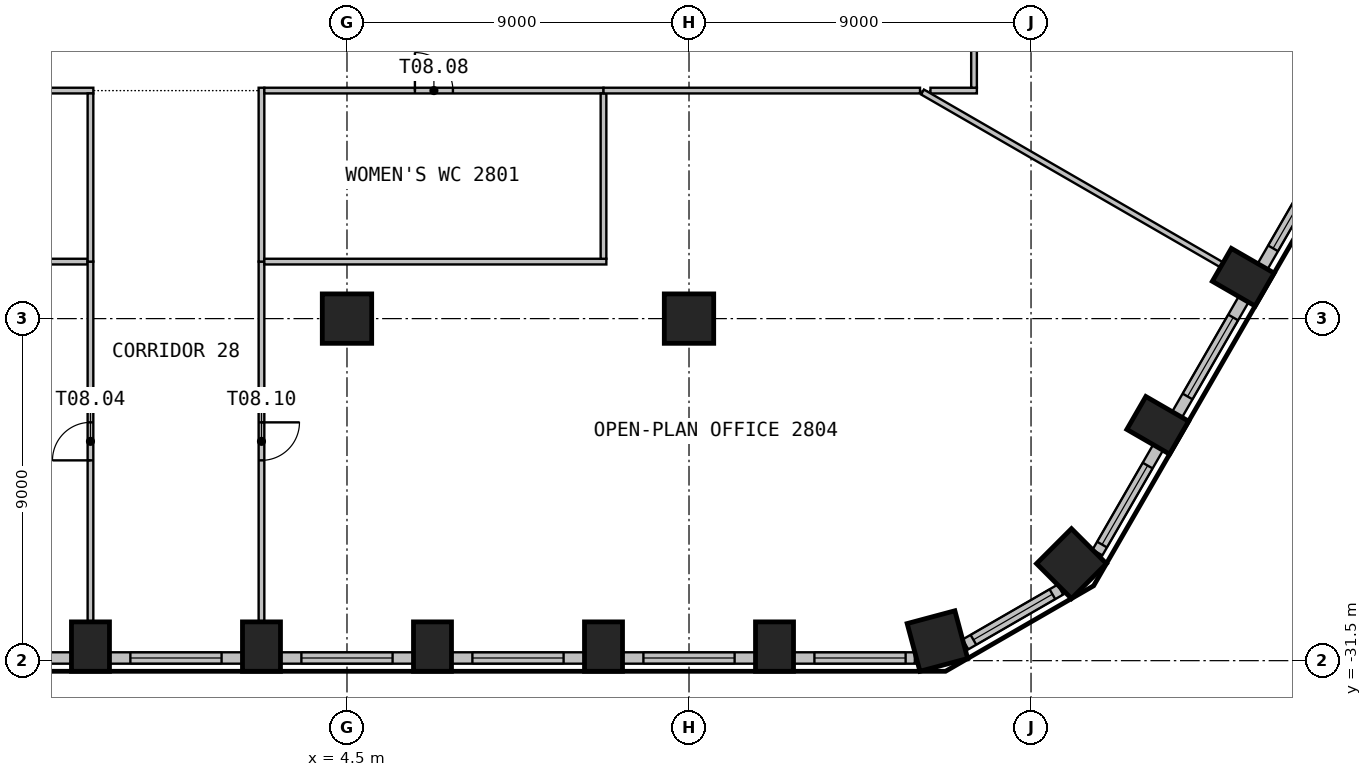
"""IFC4 building model, lengths in metres.
Left out: names, types, materials, properties, quantities, classifications, styles, units other than length and angle.
Written with IfcOpenShell. Run it as: python <this file> out.ifc"""

import sys

from ifc_helpers import new_model, si_unit, direction, frame, frame_2d, origin, origin_2d, place, context, subcontext, project, spatial, rectangle, circle, extrude, element, fill, save


model = new_model("IFC4")
c1 = context("Model", 3, precision=1e-05, world=origin(), true_north=direction((0.0, 1.0)))
c2 = subcontext(c1, "Body", "Model", "MODEL_VIEW")
j1 = project(units=[si_unit("LENGTHUNIT", "METRE"), si_unit("PLANEANGLEUNIT", "RADIAN")], contexts=[c1])
p1 = place(None, origin())
s1 = spatial("IfcSite", under=j1, at=p1, CompositionType="ELEMENT")
p2 = place(p1, origin())
s2 = spatial("IfcBuilding", under=s1, at=p2, CompositionType="ELEMENT")
p3 = place(p2, frame((0.0, 0.0, 116.4)))
s3 = spatial("IfcBuildingStorey", under=s2, at=p3, CompositionType="ELEMENT", Elevation=116.4)
for number, where, z_axis, x_axis in (
    (1, (-2.25, -31.13, 0.0), (0.0, 0.0, 1.0), (1.0, 0.0, 0.0)),
    (2, (2.25, -31.13, 0.0), (0.0, 0.0, 1.0), (1.0, 0.0, 0.0)),
    (3, (6.75, -31.13, 0.0), (0.0, 0.0, 1.0), (1.0, 0.0, 0.0)),
    (4, (11.25, -31.13, 0.0), (0.0, 0.0, 1.0), (1.0, 0.0, 0.0)),
    (5, (15.75, -31.13, 0.0), (0.0, 0.0, 1.0), (1.0, 0.0, 0.0)),
):
    element("IfcColumn", number, at=place(p3, frame(where, z_axis=z_axis, x_axis=x_axis)), inside=s3, PredefinedType="COLUMN", context=c2, shape_type="SweptSolid", body=[
        extrude(rectangle(XDim=1.0, YDim=1.3, at=origin_2d()), origin(), (0.0, 0.0, 1.0), 3.525),
    ])
for number, where, z_axis, x_axis in (
    (6, (20.037, -30.984, 0.0), (0.0, 0.0, 1.0), (0.966, 0.259, 0.0)),
    (7, (23.564, -28.947, 0.0), (0.0, 0.0, 1.0), (0.707, 0.707, 0.0)),
):
    element("IfcColumn", number, at=place(p3, frame(where, z_axis=z_axis, x_axis=x_axis)), inside=s3, PredefinedType="COLUMN", context=c2, shape_type="SweptSolid", body=[
        extrude(rectangle(XDim=1.3, YDim=1.3, at=origin_2d()), origin(), (0.0, 0.0, 1.0), 3.525),
    ])
for number, where, z_axis, x_axis in (
    (8, (25.834, -25.308, 0.0), (0.0, 0.0, 1.0), (0.5, 0.866, 0.0)),
    (9, (28.084, -21.411, 0.0), (0.0, 0.0, 1.0), (0.5, 0.866, 0.0)),
):
    element("IfcColumn", number, at=place(p3, frame(where, z_axis=z_axis, x_axis=x_axis)), inside=s3, PredefinedType="COLUMN", context=c2, shape_type="SweptSolid", body=[
        extrude(rectangle(XDim=1.0, YDim=1.3, at=origin_2d()), origin(), (0.0, 0.0, 1.0), 3.525),
    ])
for number, where, z_axis, x_axis in (
    (10, (4.5, -22.5, 0.0), (0.0, 0.0, 1.0), (1.0, 0.0, 0.0)),
    (11, (13.5, -22.5, 0.0), (0.0, 0.0, 1.0), (1.0, 0.0, 0.0)),
):
    element("IfcColumn", number, at=place(p3, frame(where, z_axis=z_axis, x_axis=x_axis)), inside=s3, PredefinedType="COLUMN", context=c2, shape_type="SweptSolid", body=[
        extrude(circle(Radius=0.65, at=origin_2d()), origin(), (0.0, 0.0, 1.0), 3.525),
    ])
p4 = place(p3, frame((-6.25, -31.43, 0.0), z_axis=(0.0, 0.0, 1.0), x_axis=(1.0, 0.0, 0.0)))
e12 = element("IfcWall", 12, at=p4, inside=s3, PredefinedType="SOLIDWALL", context=c2, shape_type="SweptSolid", body=[
    extrude(rectangle(XDim=3.499, YDim=0.3, at=frame_2d((1.75, 0.0))), origin(), (0.0, 0.0, 1.0), 3.525),
])
p5 = place(p4, frame((0.55, 0.0, 0.9)))
e13 = element("IfcOpeningElement", 13, at=p5, cuts=e12, PredefinedType="OPENING", context=c2, shape_type="SweptSolid", body=[
    extrude(rectangle(XDim=2.4, YDim=2.1, at=frame_2d((1.2, 1.05))), frame((0.0, 0.16, 0.0), z_axis=(0.0, -1.0, 0.0), x_axis=(1.0, 0.0, 0.0)), (0.0, 0.0, 1.0), 0.32),
])
p6 = place(p3, frame((-1.75, -31.43, 0.0), z_axis=(0.0, 0.0, 1.0), x_axis=(1.0, 0.0, 0.0)))
e14 = element("IfcWall", 14, at=p6, inside=s3, PredefinedType="SOLIDWALL", context=c2, shape_type="SweptSolid", body=[
    extrude(rectangle(XDim=3.499, YDim=0.3, at=frame_2d((1.75, 0.0))), origin(), (0.0, 0.0, 1.0), 3.525),
])
p7 = place(p6, frame((0.55, 0.0, 0.9)))
e15 = element("IfcOpeningElement", 15, at=p7, cuts=e14, PredefinedType="OPENING", context=c2, shape_type="SweptSolid", body=[
    extrude(rectangle(XDim=2.4, YDim=2.1, at=frame_2d((1.2, 1.05))), frame((0.0, 0.16, 0.0), z_axis=(0.0, -1.0, 0.0), x_axis=(1.0, 0.0, 0.0)), (0.0, 0.0, 1.0), 0.32),
])
p8 = place(p3, frame((2.75, -31.43, 0.0), z_axis=(0.0, 0.0, 1.0), x_axis=(1.0, 0.0, 0.0)))
e16 = element("IfcWall", 16, at=p8, inside=s3, PredefinedType="SOLIDWALL", context=c2, shape_type="SweptSolid", body=[
    extrude(rectangle(XDim=3.499, YDim=0.3, at=frame_2d((1.75, 0.0))), origin(), (0.0, 0.0, 1.0), 3.525),
])
p9 = place(p8, frame((0.55, 0.0, 0.9)))
e17 = element("IfcOpeningElement", 17, at=p9, cuts=e16, PredefinedType="OPENING", context=c2, shape_type="SweptSolid", body=[
    extrude(rectangle(XDim=2.4, YDim=2.1, at=frame_2d((1.2, 1.05))), frame((0.0, 0.16, 0.0), z_axis=(0.0, -1.0, 0.0), x_axis=(1.0, 0.0, 0.0)), (0.0, 0.0, 1.0), 0.32),
])
p10 = place(p3, frame((7.25, -31.43, 0.0), z_axis=(0.0, 0.0, 1.0), x_axis=(1.0, 0.0, 0.0)))
e18 = element("IfcWall", 18, at=p10, inside=s3, PredefinedType="SOLIDWALL", context=c2, shape_type="SweptSolid", body=[
    extrude(rectangle(XDim=3.499, YDim=0.3, at=frame_2d((1.75, 0.0))), origin(), (0.0, 0.0, 1.0), 3.525),
])
p11 = place(p10, frame((0.55, 0.0, 0.9)))
e19 = element("IfcOpeningElement", 19, at=p11, cuts=e18, PredefinedType="OPENING", context=c2, shape_type="SweptSolid", body=[
    extrude(rectangle(XDim=2.4, YDim=2.1, at=frame_2d((1.2, 1.05))), frame((0.0, 0.16, 0.0), z_axis=(0.0, -1.0, 0.0), x_axis=(1.0, 0.0, 0.0)), (0.0, 0.0, 1.0), 0.32),
])
p12 = place(p3, frame((11.75, -31.43, 0.0), z_axis=(0.0, 0.0, 1.0), x_axis=(1.0, 0.0, 0.0)))
e20 = element("IfcWall", 20, at=p12, inside=s3, PredefinedType="SOLIDWALL", context=c2, shape_type="SweptSolid", body=[
    extrude(rectangle(XDim=3.499, YDim=0.3, at=frame_2d((1.75, 0.0))), origin(), (0.0, 0.0, 1.0), 3.525),
])
p13 = place(p12, frame((0.55, 0.0, 0.9)))
e21 = element("IfcOpeningElement", 21, at=p13, cuts=e20, PredefinedType="OPENING", context=c2, shape_type="SweptSolid", body=[
    extrude(rectangle(XDim=2.4, YDim=2.1, at=frame_2d((1.2, 1.05))), frame((0.0, 0.16, 0.0), z_axis=(0.0, -1.0, 0.0), x_axis=(1.0, 0.0, 0.0)), (0.0, 0.0, 1.0), 0.32),
])
p14 = place(p3, frame((16.25, -31.43, 0.0), z_axis=(0.0, 0.0, 1.0), x_axis=(1.0, 0.0, 0.0)))
e22 = element("IfcWall", 22, at=p14, inside=s3, PredefinedType="SOLIDWALL", context=c2, shape_type="SweptSolid", body=[
    extrude(rectangle(XDim=3.192, YDim=0.3, at=frame_2d((1.596, 0.0))), origin(), (0.0, 0.0, 1.0), 3.525),
])
p15 = place(p14, frame((0.55, 0.0, 0.9)))
e23 = element("IfcOpeningElement", 23, at=p15, cuts=e22, PredefinedType="OPENING", context=c2, shape_type="SweptSolid", body=[
    extrude(rectangle(XDim=2.4, YDim=2.1, at=frame_2d((1.2, 1.05))), frame((0.0, 0.16, 0.0), z_axis=(0.0, -1.0, 0.0), x_axis=(1.0, 0.0, 0.0)), (0.0, 0.0, 1.0), 0.32),
])
p16 = place(p3, frame((20.774, -31.073, 0.0), z_axis=(0.0, 0.0, 1.0), x_axis=(0.866053149362, 0.49995194017, 0.0)))
e24 = element("IfcWall", 24, at=p16, inside=s3, PredefinedType="SOLIDWALL", context=c2, shape_type="SweptSolid", body=[
    extrude(rectangle(XDim=2.885, YDim=0.3, at=frame_2d((1.443, 0.0))), origin(), (0.0, 0.0, 1.0), 3.525),
])
p17 = place(p16, frame((0.243, 0.0, 0.9)))
e25 = element("IfcOpeningElement", 25, at=p17, cuts=e24, PredefinedType="OPENING", context=c2, shape_type="SweptSolid", body=[
    extrude(rectangle(XDim=2.4, YDim=2.1, at=frame_2d((1.2, 1.05))), frame((0.0, 0.16, 0.0), z_axis=(0.0, -1.0, 0.0), x_axis=(1.0, 0.0, 0.0)), (0.0, 0.0, 1.0), 0.32),
])
p18 = place(p3, frame((24.248, -28.656, 0.0), z_axis=(0.0, 0.0, 1.0), x_axis=(0.500004907028, 0.866022570692, 0.0)))
e26 = element("IfcWall", 26, at=p18, inside=s3, PredefinedType="SOLIDWALL", context=c2, shape_type="SweptSolid", body=[
    extrude(rectangle(XDim=3.192, YDim=0.3, at=frame_2d((1.596, 0.0))), origin(), (0.0, 0.0, 1.0), 3.525),
])
p19 = place(p18, frame((0.243, 0.0, 0.9)))
e27 = element("IfcOpeningElement", 27, at=p19, cuts=e26, PredefinedType="OPENING", context=c2, shape_type="SweptSolid", body=[
    extrude(rectangle(XDim=2.4, YDim=2.1, at=frame_2d((1.2, 1.05))), frame((0.0, 0.16, 0.0), z_axis=(0.0, -1.0, 0.0), x_axis=(1.0, 0.0, 0.0)), (0.0, 0.0, 1.0), 0.32),
])
p20 = place(p3, frame((26.344, -25.024, 0.0), z_axis=(0.0, 0.0, 1.0), x_axis=(0.499996256241, 0.866027565234, 0.0)))
e28 = element("IfcWall", 28, at=p20, inside=s3, PredefinedType="SOLIDWALL", context=c2, shape_type="SweptSolid", body=[
    extrude(rectangle(XDim=3.499, YDim=0.3, at=frame_2d((1.75, 0.0))), origin(), (0.0, 0.0, 1.0), 3.525),
])
p21 = place(p20, frame((0.55, 0.0, 0.9)))
e29 = element("IfcOpeningElement", 29, at=p21, cuts=e28, PredefinedType="OPENING", context=c2, shape_type="SweptSolid", body=[
    extrude(rectangle(XDim=2.4, YDim=2.1, at=frame_2d((1.2, 1.05))), frame((0.0, 0.16, 0.0), z_axis=(0.0, -1.0, 0.0), x_axis=(1.0, 0.0, 0.0)), (0.0, 0.0, 1.0), 0.32),
])
p22 = place(p3, frame((28.594, -21.127, 0.0), z_axis=(0.0, 0.0, 1.0), x_axis=(0.499996256241, 0.866027565234, 0.0)))
e30 = element("IfcWall", 30, at=p22, inside=s3, PredefinedType="SOLIDWALL", context=c2, shape_type="SweptSolid", body=[
    extrude(rectangle(XDim=3.499, YDim=0.3, at=frame_2d((1.75, 0.0))), origin(), (0.0, 0.0, 1.0), 3.525),
])
p23 = place(p22, frame((0.55, 0.0, 0.9)))
e31 = element("IfcOpeningElement", 31, at=p23, cuts=e30, PredefinedType="OPENING", context=c2, shape_type="SweptSolid", body=[
    extrude(rectangle(XDim=2.4, YDim=2.1, at=frame_2d((1.2, 1.05))), frame((0.0, 0.16, 0.0), z_axis=(0.0, -1.0, 0.0), x_axis=(1.0, 0.0, 0.0)), (0.0, 0.0, 1.0), 0.32),
])
p24 = place(p3, frame((-10.461, -21.0, 0.0), z_axis=(0.0, 0.0, 1.0), x_axis=(1.0, 0.0, 0.0)))
e32 = element("IfcWall", 32, at=p24, inside=s3, PredefinedType="PARTITIONING", context=c2, shape_type="SweptSolid", body=[
    extrude(rectangle(XDim=8.136, YDim=0.15, at=frame_2d((4.068, 0.0))), origin(), (0.0, 0.0, 1.0), 3.525),
])
p25 = place(p3, frame((-8.218, -16.5, 0.0), z_axis=(0.0, 0.0, 1.0), x_axis=(1.0, 0.0, 0.0)))
e33 = element("IfcWall", 33, at=p25, inside=s3, PredefinedType="PARTITIONING", context=c2, shape_type="SweptSolid", body=[
    extrude(rectangle(XDim=6.043, YDim=0.15, at=frame_2d((3.021, 0.0))), origin(), (0.0, 0.0, 1.0), 3.525),
])
p26 = place(p25, frame((2.521, 0.0, 0.0)))
e34 = element("IfcOpeningElement", 34, at=p26, cuts=e33, PredefinedType="OPENING", context=c2, shape_type="SweptSolid", body=[
    extrude(rectangle(XDim=1.0, YDim=2.1, at=frame_2d((0.5, 1.05))), frame((0.0, 0.085, 0.0), z_axis=(0.0, -1.0, 0.0), x_axis=(1.0, 0.0, 0.0)), (0.0, 0.0, 1.0), 0.17),
])
p27 = place(p3, frame((-2.25, -30.46, 0.0), z_axis=(0.0, 0.0, 1.0), x_axis=(0.0, 1.0, 0.0)))
e35 = element("IfcWall", 35, at=p27, inside=s3, PredefinedType="PARTITIONING", context=c2, shape_type="SweptSolid", body=[
    extrude(rectangle(XDim=9.46, YDim=0.15, at=frame_2d((4.73, 0.0))), origin(), (0.0, 0.0, 1.0), 3.525),
])
p28 = place(p27, frame((4.23, 0.0, 0.0)))
e36 = element("IfcOpeningElement", 36, at=p28, cuts=e35, PredefinedType="OPENING", context=c2, shape_type="SweptSolid", body=[
    extrude(rectangle(XDim=1.0, YDim=2.1, at=frame_2d((0.5, 1.05))), frame((0.0, 0.085, 0.0), z_axis=(0.0, -1.0, 0.0), x_axis=(1.0, 0.0, 0.0)), (0.0, 0.0, 1.0), 0.17),
])
p29 = place(p3, frame((-2.25, -21.0, 0.0), z_axis=(0.0, 0.0, 1.0), x_axis=(0.0, 1.0, 0.0)))
e37 = element("IfcWall", 37, at=p29, inside=s3, PredefinedType="PARTITIONING", context=c2, shape_type="SweptSolid", body=[
    extrude(rectangle(XDim=4.425, YDim=0.15, at=frame_2d((2.212, 0.0))), origin(), (0.0, 0.0, 1.0), 3.525),
])
p30 = place(p3, frame((2.25, -21.0, 0.0), z_axis=(0.0, 0.0, 1.0), x_axis=(0.0, -1.0, 0.0)))
e38 = element("IfcWall", 38, at=p30, inside=s3, PredefinedType="PARTITIONING", context=c2, shape_type="SweptSolid", body=[
    extrude(rectangle(XDim=9.46, YDim=0.15, at=frame_2d((4.73, 0.0))), origin(), (0.0, 0.0, 1.0), 3.525),
])
p31 = place(p30, frame((4.23, 0.0, 0.0)))
e39 = element("IfcOpeningElement", 39, at=p31, cuts=e38, PredefinedType="OPENING", context=c2, shape_type="SweptSolid", body=[
    extrude(rectangle(XDim=1.0, YDim=2.1, at=frame_2d((0.5, 1.05))), frame((0.0, 0.085, 0.0), z_axis=(0.0, -1.0, 0.0), x_axis=(1.0, 0.0, 0.0)), (0.0, 0.0, 1.0), 0.17),
])
p32 = place(p3, frame((2.25, -16.425, 0.0), z_axis=(0.0, 0.0, 1.0), x_axis=(0.0, -1.0, 0.0)))
e40 = element("IfcWall", 40, at=p32, inside=s3, PredefinedType="PARTITIONING", context=c2, shape_type="SweptSolid", body=[
    extrude(rectangle(XDim=4.575, YDim=0.15, at=frame_2d((2.288, 0.0))), origin(), (0.0, 0.0, 1.0), 3.525),
])
p33 = place(p3, frame((11.325, -21.0, 0.0), z_axis=(0.0, 0.0, 1.0), x_axis=(-1.0, 0.0, 0.0)))
e41 = element("IfcWall", 41, at=p33, inside=s3, PredefinedType="PARTITIONING", context=c2, shape_type="SweptSolid", body=[
    extrude(rectangle(XDim=9.0, YDim=0.15, at=frame_2d((4.5, 0.0))), origin(), (0.0, 0.0, 1.0), 3.525),
])
p34 = place(p3, frame((2.325, -16.5, 0.0), z_axis=(0.0, 0.0, 1.0), x_axis=(1.0, 0.0, 0.0)))
e42 = element("IfcWall", 42, at=p34, inside=s3, PredefinedType="PARTITIONING", context=c2, shape_type="SweptSolid", body=[
    extrude(rectangle(XDim=8.925, YDim=0.15, at=frame_2d((4.462, 0.0))), origin(), (0.0, 0.0, 1.0), 3.525),
])
p35 = place(p34, frame((3.962, 0.0, 0.0)))
e43 = element("IfcOpeningElement", 43, at=p35, cuts=e42, PredefinedType="OPENING", context=c2, shape_type="SweptSolid", body=[
    extrude(rectangle(XDim=1.0, YDim=2.1, at=frame_2d((0.5, 1.05))), frame((0.0, 0.085, 0.0), z_axis=(0.0, -1.0, 0.0), x_axis=(1.0, 0.0, 0.0)), (0.0, 0.0, 1.0), 0.17),
])
p36 = place(p3, frame((11.25, -16.575, 0.0), z_axis=(0.0, 0.0, 1.0), x_axis=(0.0, -1.0, 0.0)))
e44 = element("IfcWall", 44, at=p36, inside=s3, PredefinedType="PARTITIONING", context=c2, shape_type="SweptSolid", body=[
    extrude(rectangle(XDim=4.35, YDim=0.15, at=frame_2d((2.175, 0.0))), origin(), (0.0, 0.0, 1.0), 3.525),
])
p37 = place(p3, frame((11.25, -16.5, 0.0), z_axis=(0.0, 0.0, 1.0), x_axis=(1.0, 0.0, 0.0)))
e45 = element("IfcWall", 45, at=p37, inside=s3, PredefinedType="PARTITIONING", context=c2, shape_type="SweptSolid", body=[
    extrude(rectangle(XDim=8.329, YDim=0.15, at=frame_2d((4.165, 0.0))), origin(), (0.0, 0.0, 1.0), 3.525),
])
p38 = place(p3, frame((19.854, -16.5, 0.0), z_axis=(0.0, 0.0, 1.0), x_axis=(1.0, 0.0, 0.0)))
e46 = element("IfcWall", 46, at=p38, inside=s3, PredefinedType="PARTITIONING", context=c2, shape_type="SweptSolid", body=[
    extrude(rectangle(XDim=1.221, YDim=0.15, at=frame_2d((0.61, 0.0))), origin(), (0.0, 0.0, 1.0), 3.525),
])
p39 = place(p3, frame((19.644, -16.538, 0.0), z_axis=(0.0, 0.0, 1.0), x_axis=(0.866004606565, -0.500036020111, 0.0)))
e47 = element("IfcWall", 47, at=p39, inside=s3, PredefinedType="PARTITIONING", context=c2, shape_type="SweptSolid", body=[
    extrude(rectangle(XDim=9.076, YDim=0.15, at=frame_2d((4.538, 0.0))), origin(), (0.0, 0.0, 1.0), 3.525),
])
p40 = place(p3, frame((21.0, -16.425, 0.0), z_axis=(0.0, 0.0, 1.0), x_axis=(0.0, 1.0, 0.0)))
e48 = element("IfcWall", 48, at=p40, inside=s3, PredefinedType="PARTITIONING", context=c2, shape_type="SweptSolid", body=[
    extrude(rectangle(XDim=19.238, YDim=0.15, at=frame_2d((9.619, 0.0))), origin(), (0.0, 0.0, 1.0), 3.525),
])
p41 = place(p40, frame((9.119, 0.0, 0.0)))
e49 = element("IfcOpeningElement", 49, at=p41, cuts=e48, PredefinedType="OPENING", context=c2, shape_type="SweptSolid", body=[
    extrude(rectangle(XDim=1.0, YDim=2.1, at=frame_2d((0.5, 1.05))), frame((0.0, 0.085, 0.0), z_axis=(0.0, -1.0, 0.0), x_axis=(1.0, 0.0, 0.0)), (0.0, 0.0, 1.0), 0.17),
])
p42 = place(p7, origin())
e50 = element("IfcWindow", 50, at=p42, inside=s3, PartitioningType="SINGLE_PANEL", PredefinedType="WINDOW", context=c2, shape_type="SweptSolid", body=[
    extrude(rectangle(XDim=2.4, YDim=2.1, at=frame_2d((1.2, 1.05))), frame((0.0, 0.03, 0.0), z_axis=(0.0, -1.0, 0.0), x_axis=(1.0, 0.0, 0.0)), (0.0, 0.0, 1.0), 0.06),
])
fill(e15, e50)
p43 = place(p9, origin())
e51 = element("IfcWindow", 51, at=p43, inside=s3, PartitioningType="SINGLE_PANEL", PredefinedType="WINDOW", context=c2, shape_type="SweptSolid", body=[
    extrude(rectangle(XDim=2.4, YDim=2.1, at=frame_2d((1.2, 1.05))), frame((0.0, 0.03, 0.0), z_axis=(0.0, -1.0, 0.0), x_axis=(1.0, 0.0, 0.0)), (0.0, 0.0, 1.0), 0.06),
])
fill(e17, e51)
p44 = place(p11, origin())
e52 = element("IfcWindow", 52, at=p44, inside=s3, PartitioningType="SINGLE_PANEL", PredefinedType="WINDOW", context=c2, shape_type="SweptSolid", body=[
    extrude(rectangle(XDim=2.4, YDim=2.1, at=frame_2d((1.2, 1.05))), frame((0.0, 0.03, 0.0), z_axis=(0.0, -1.0, 0.0), x_axis=(1.0, 0.0, 0.0)), (0.0, 0.0, 1.0), 0.06),
])
fill(e19, e52)
p45 = place(p13, origin())
e53 = element("IfcWindow", 53, at=p45, inside=s3, PartitioningType="SINGLE_PANEL", PredefinedType="WINDOW", context=c2, shape_type="SweptSolid", body=[
    extrude(rectangle(XDim=2.4, YDim=2.1, at=frame_2d((1.2, 1.05))), frame((0.0, 0.03, 0.0), z_axis=(0.0, -1.0, 0.0), x_axis=(1.0, 0.0, 0.0)), (0.0, 0.0, 1.0), 0.06),
])
fill(e21, e53)
p46 = place(p15, origin())
e54 = element("IfcWindow", 54, at=p46, inside=s3, PartitioningType="SINGLE_PANEL", PredefinedType="WINDOW", context=c2, shape_type="SweptSolid", body=[
    extrude(rectangle(XDim=2.4, YDim=2.1, at=frame_2d((1.2, 1.05))), frame((0.0, 0.03, 0.0), z_axis=(0.0, -1.0, 0.0), x_axis=(1.0, 0.0, 0.0)), (0.0, 0.0, 1.0), 0.06),
])
fill(e23, e54)
p47 = place(p17, origin())
e55 = element("IfcWindow", 55, at=p47, inside=s3, PartitioningType="SINGLE_PANEL", PredefinedType="WINDOW", context=c2, shape_type="SweptSolid", body=[
    extrude(rectangle(XDim=2.4, YDim=2.1, at=frame_2d((1.2, 1.05))), frame((0.0, 0.03, 0.0), z_axis=(0.0, -1.0, 0.0), x_axis=(1.0, 0.0, 0.0)), (0.0, 0.0, 1.0), 0.06),
])
fill(e25, e55)
p48 = place(p19, origin())
e56 = element("IfcWindow", 56, at=p48, inside=s3, PartitioningType="SINGLE_PANEL", PredefinedType="WINDOW", context=c2, shape_type="SweptSolid", body=[
    extrude(rectangle(XDim=2.4, YDim=2.1, at=frame_2d((1.2, 1.05))), frame((0.0, 0.03, 0.0), z_axis=(0.0, -1.0, 0.0), x_axis=(1.0, 0.0, 0.0)), (0.0, 0.0, 1.0), 0.06),
])
fill(e27, e56)
p49 = place(p21, origin())
e57 = element("IfcWindow", 57, at=p49, inside=s3, PartitioningType="SINGLE_PANEL", PredefinedType="WINDOW", context=c2, shape_type="SweptSolid", body=[
    extrude(rectangle(XDim=2.4, YDim=2.1, at=frame_2d((1.2, 1.05))), frame((0.0, 0.03, 0.0), z_axis=(0.0, -1.0, 0.0), x_axis=(1.0, 0.0, 0.0)), (0.0, 0.0, 1.0), 0.06),
])
fill(e29, e57)
p50 = place(p23, origin())
e58 = element("IfcWindow", 58, at=p50, inside=s3, PartitioningType="SINGLE_PANEL", PredefinedType="WINDOW", context=c2, shape_type="SweptSolid", body=[
    extrude(rectangle(XDim=2.4, YDim=2.1, at=frame_2d((1.2, 1.05))), frame((0.0, 0.03, 0.0), z_axis=(0.0, -1.0, 0.0), x_axis=(1.0, 0.0, 0.0)), (0.0, 0.0, 1.0), 0.06),
])
fill(e31, e58)
p51 = place(p28, origin())
e59 = element("IfcDoor", 59, at=p51, inside=s3, OperationType="SINGLE_SWING_LEFT", PredefinedType="DOOR", context=c2, shape_type="SweptSolid", body=[
    extrude(rectangle(XDim=1.0, YDim=2.1, at=frame_2d((0.5, 1.05))), frame((0.0, 0.025, 0.0), z_axis=(0.0, -1.0, 0.0), x_axis=(1.0, 0.0, 0.0)), (0.0, 0.0, 1.0), 0.05),
])
fill(e36, e59)
p52 = place(p35, origin())
e60 = element("IfcDoor", 60, at=p52, inside=s3, OperationType="SINGLE_SWING_RIGHT", PredefinedType="DOOR", context=c2, shape_type="SweptSolid", body=[
    extrude(rectangle(XDim=1.0, YDim=2.1, at=frame_2d((0.5, 1.05))), frame((0.0, 0.025, 0.0), z_axis=(0.0, -1.0, 0.0), x_axis=(1.0, 0.0, 0.0)), (0.0, 0.0, 1.0), 0.05),
])
fill(e43, e60)
p53 = place(p31, origin())
e61 = element("IfcDoor", 61, at=p53, inside=s3, OperationType="SINGLE_SWING_RIGHT", PredefinedType="DOOR", context=c2, shape_type="SweptSolid", body=[
    extrude(rectangle(XDim=1.0, YDim=2.1, at=frame_2d((0.5, 1.05))), frame((0.0, 0.025, 0.0), z_axis=(0.0, -1.0, 0.0), x_axis=(1.0, 0.0, 0.0)), (0.0, 0.0, 1.0), 0.05),
])
fill(e39, e61)
save(model, sys.argv[1])
